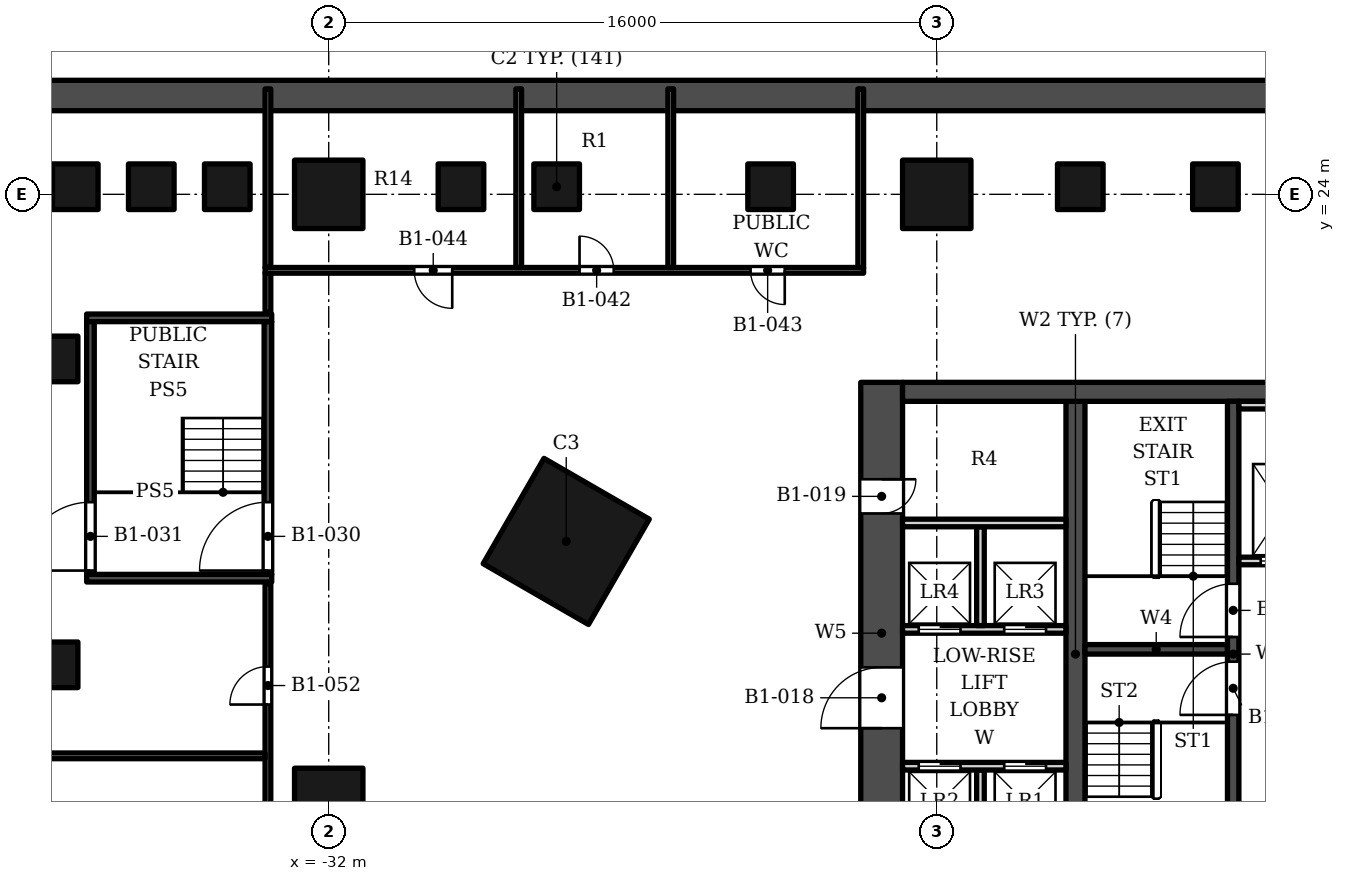
"""IFC4 building model, lengths in metres.
Left out: names, types, materials, properties, quantities, classifications, styles, units other than length and angle.
Written with IfcOpenShell. Run it as: python <this file> out.ifc"""

import sys

from ifc_helpers import new_model, si_unit, direction, frame, frame_2d, origin, origin_2d, place, context, subcontext, project, spatial, rectangle, extrude, element, fill, save


model = new_model("IFC4")
c1 = context("Model", 3, precision=1e-05, world=origin(), true_north=direction((0.0, 1.0)))
c2 = subcontext(c1, "Body", "Model", "MODEL_VIEW")
j1 = project(units=[si_unit("LENGTHUNIT", "METRE"), si_unit("PLANEANGLEUNIT", "RADIAN")], contexts=[c1])
p1 = place(None, origin())
s1 = spatial("IfcSite", under=j1, at=p1, CompositionType="ELEMENT")
p2 = place(p1, origin())
s2 = spatial("IfcBuilding", under=s1, at=p2, CompositionType="ELEMENT")
p3 = place(p2, frame((0.0, 0.0, -5.0)))
s3 = spatial("IfcBuildingStorey", under=s2, at=p3, CompositionType="ELEMENT", Elevation=-5.0)
p4 = place(p3, frame((46.0, 26.6, 0.0), z_axis=(0.0, 0.0, 1.0), x_axis=(-1.0, 0.0, 0.0)))
e1 = element("IfcWall", 1, at=p4, inside=s3, PredefinedType="SHEAR", context=c2, shape_type="SweptSolid", body=[
    extrude(rectangle(XDim=92.0, YDim=0.8, at=frame_2d((46.0, 0.0))), origin(), (0.0, 0.0, 1.0), 5.0),
])
for number, where, z_axis, x_axis in (
    (2, (-32.0, 8.0, 0.0), (0.0, 0.0, 1.0), (1.0, 0.0, 0.0)),
    (3, (-32.0, 24.0, 0.0), (0.0, 0.0, 1.0), (1.0, 0.0, 0.0)),
    (4, (-16.0, 24.0, 0.0), (0.0, 0.0, 1.0), (1.0, 0.0, 0.0)),
):
    element("IfcColumn", number, at=place(p3, frame(where, z_axis=z_axis, x_axis=x_axis)), inside=s3, PredefinedType="COLUMN", context=c2, shape_type="SweptSolid", body=[
        extrude(rectangle(XDim=1.8, YDim=1.8, at=origin_2d()), origin(), (0.0, 0.0, 1.0), 5.0),
    ])
for number, where, z_axis, x_axis in (
    (5, (-39.2, 19.669, 0.0), (0.0, 0.0, 1.0), (1.0, 0.0, 0.0)),
    (6, (-34.669, 24.2, 0.0), (0.0, 0.0, 1.0), (1.0, 0.0, 0.0)),
    (7, (-39.2, 11.62, 0.0), (0.0, 0.0, 1.0), (1.0, 0.0, 0.0)),
    (8, (-26.002, 24.2, 0.0), (0.0, 0.0, 1.0), (1.0, 0.0, 0.0)),
    (9, (-8.667, 24.2, 0.0), (0.0, 0.0, 1.0), (1.0, 0.0, 0.0)),
    (10, (-36.669, 24.2, 0.0), (0.0, 0.0, 1.0), (1.0, 0.0, 0.0)),
    (11, (-28.52, 24.2, 0.0), (0.0, 0.0, 1.0), (1.0, 0.0, 0.0)),
    (12, (-20.372, 24.2, 0.0), (0.0, 0.0, 1.0), (1.0, 0.0, 0.0)),
    (13, (-12.223, 24.2, 0.0), (0.0, 0.0, 1.0), (1.0, 0.0, 0.0)),
    (14, (-38.669, 24.2, 0.0), (0.0, 0.0, 1.0), (1.0, 0.0, 0.0)),
):
    element("IfcColumn", number, at=place(p3, frame(where, z_axis=z_axis, x_axis=x_axis)), inside=s3, PredefinedType="COLUMN", context=c2, shape_type="SweptSolid", body=[
        extrude(rectangle(XDim=1.2, YDim=1.2, at=origin_2d()), origin(), (0.0, 0.0, 1.0), 5.0),
    ])
p5 = place(p3, frame((-25.75, 14.867, 0.0), z_axis=(0.0, 0.0, 1.0), x_axis=(0.866025386331, -0.50000003023, 0.0)))
e15 = element("IfcColumn", 15, at=p5, inside=s3, PredefinedType="COLUMN", context=c2, shape_type="SweptSolid", body=[
    extrude(rectangle(XDim=3.2, YDim=3.2, at=origin_2d()), origin(), (0.0, 0.0, 1.0), 5.0),
])
p6 = place(p3, frame((-16.9, 18.802, 0.0), z_axis=(0.0, 0.0, 1.0), x_axis=(1.0, 0.0, 0.0)))
e16 = element("IfcWall", 16, at=p6, inside=s3, PredefinedType="SHEAR", context=c2, shape_type="SweptSolid", body=[
    extrude(rectangle(XDim=33.8, YDim=0.5, at=frame_2d((16.9, 0.0))), origin(), (0.0, 0.0, 1.0), 5.0),
])
p7 = place(p3, frame((-12.35, 5.253, 0.0), z_axis=(0.0, 0.0, 1.0), x_axis=(0.0, 1.0, 0.0)))
e17 = element("IfcWall", 17, at=p7, inside=s3, PredefinedType="SHEAR", context=c2, shape_type="SweptSolid", body=[
    extrude(rectangle(XDim=13.3, YDim=0.5, at=frame_2d((6.65, 0.0))), origin(), (0.0, 0.0, 1.0), 5.0),
])
p8 = place(p3, frame((-8.2, 5.253, 0.0), z_axis=(0.0, 0.0, 1.0), x_axis=(0.0, 1.0, 0.0)))
e18 = element("IfcWall", 18, at=p8, inside=s3, PredefinedType="SHEAR", context=c2, shape_type="SweptSolid", body=[
    extrude(rectangle(XDim=13.3, YDim=0.3, at=frame_2d((6.65, 0.0))), origin(), (0.0, 0.0, 1.0), 5.0),
])
p9 = place(p8, frame((7.1, 0.0, 0.0)))
e19 = element("IfcOpeningElement", 19, at=p9, cuts=e18, PredefinedType="OPENING", context=c2, shape_type="SweptSolid", body=[
    extrude(rectangle(XDim=1.4, YDim=2.1, at=frame_2d((0.7, 1.05))), frame((0.0, 0.16, 0.0), z_axis=(0.0, -1.0, 0.0), x_axis=(1.0, 0.0, 0.0)), (0.0, 0.0, 1.0), 0.32),
])
p10 = place(p8, frame((5.05, 0.0, 0.0)))
e20 = element("IfcOpeningElement", 20, at=p10, cuts=e18, PredefinedType="OPENING", context=c2, shape_type="SweptSolid", body=[
    extrude(rectangle(XDim=1.4, YDim=2.1, at=frame_2d((0.7, 1.05))), frame((0.0, 0.16, 0.0), z_axis=(0.0, -1.0, 0.0), x_axis=(1.0, 0.0, 0.0)), (0.0, 0.0, 1.0), 0.32),
])
p11 = place(p3, frame((-12.1, 12.028, 0.0), z_axis=(0.0, 0.0, 1.0), x_axis=(1.0, 0.0, 0.0)))
e21 = element("IfcWall", 21, at=p11, inside=s3, PredefinedType="SHEAR", context=c2, shape_type="SweptSolid", body=[
    extrude(rectangle(XDim=3.75, YDim=0.25, at=frame_2d((1.875, 0.0))), origin(), (0.0, 0.0, 1.0), 5.0),
])
p12 = place(p3, frame((-17.45, 5.853, 0.0), z_axis=(0.0, 0.0, 1.0), x_axis=(0.0, 1.0, 0.0)))
e22 = element("IfcWall", 22, at=p12, inside=s3, PredefinedType="SHEAR", context=c2, shape_type="SweptSolid", body=[
    extrude(rectangle(XDim=13.2, YDim=1.1, at=frame_2d((6.6, 0.0))), origin(), (0.0, 0.0, 1.0), 5.0),
])
p13 = place(p12, frame((4.1, 0.0, 0.0)))
e23 = element("IfcOpeningElement", 23, at=p13, cuts=e22, PredefinedType="OPENING", context=c2, shape_type="SweptSolid", body=[
    extrude(rectangle(XDim=1.6, YDim=2.1, at=frame_2d((0.8, 1.05))), frame((0.0, 0.56, 0.0), z_axis=(0.0, -1.0, 0.0), x_axis=(1.0, 0.0, 0.0)), (0.0, 0.0, 1.0), 1.12),
])
p14 = place(p12, frame((9.75, 0.0, 0.0)))
e24 = element("IfcOpeningElement", 24, at=p14, cuts=e22, PredefinedType="OPENING", context=c2, shape_type="SweptSolid", body=[
    extrude(rectangle(XDim=0.9, YDim=2.1, at=frame_2d((0.45, 1.05))), frame((0.0, 0.56, 0.0), z_axis=(0.0, -1.0, 0.0), x_axis=(1.0, 0.0, 0.0)), (0.0, 0.0, 1.0), 1.12),
])
p15 = place(p3, frame((-14.85, 6.353, 0.0), z_axis=(0.0, 0.0, 1.0), x_axis=(0.0, 1.0, 0.0)))
e25 = element("IfcWall", 25, at=p15, inside=s3, PredefinedType="SOLIDWALL", context=c2, shape_type="SweptSolid", body=[
    extrude(rectangle(XDim=2.5, YDim=0.2, at=frame_2d((1.25, 0.0))), origin(), (0.0, 0.0, 1.0), 4.45),
])
p16 = place(p3, frame((-16.9, 8.953, 0.0), z_axis=(0.0, 0.0, 1.0), x_axis=(1.0, 0.0, 0.0)))
e26 = element("IfcWall", 26, at=p16, inside=s3, PredefinedType="SOLIDWALL", context=c2, shape_type="SweptSolid", body=[
    extrude(rectangle(XDim=4.3, YDim=0.2, at=frame_2d((2.15, 0.0))), origin(), (0.0, 0.0, 1.0), 4.45),
])
p17 = place(p16, frame((2.675, 0.0, 0.0)))
e27 = element("IfcOpeningElement", 27, at=p17, cuts=e26, PredefinedType="OPENING", context=c2, shape_type="SweptSolid", body=[
    extrude(rectangle(XDim=1.1, YDim=2.1, at=frame_2d((0.55, 1.05))), frame((0.0, 0.11, 0.0), z_axis=(0.0, -1.0, 0.0), x_axis=(1.0, 0.0, 0.0)), (0.0, 0.0, 1.0), 0.22),
])
p18 = place(p16, frame((0.425, 0.0, 0.0)))
e28 = element("IfcOpeningElement", 28, at=p18, cuts=e26, PredefinedType="OPENING", context=c2, shape_type="SweptSolid", body=[
    extrude(rectangle(XDim=1.1, YDim=2.1, at=frame_2d((0.55, 1.05))), frame((0.0, 0.11, 0.0), z_axis=(0.0, -1.0, 0.0), x_axis=(1.0, 0.0, 0.0)), (0.0, 0.0, 1.0), 0.22),
])
p19 = place(p3, frame((-16.9, 12.552, 0.0), z_axis=(0.0, 0.0, 1.0), x_axis=(1.0, 0.0, 0.0)))
e29 = element("IfcWall", 29, at=p19, inside=s3, PredefinedType="SOLIDWALL", context=c2, shape_type="SweptSolid", body=[
    extrude(rectangle(XDim=4.3, YDim=0.2, at=frame_2d((2.15, 0.0))), origin(), (0.0, 0.0, 1.0), 4.45),
])
p20 = place(p19, frame((2.675, 0.0, 0.0)))
e30 = element("IfcOpeningElement", 30, at=p20, cuts=e29, PredefinedType="OPENING", context=c2, shape_type="SweptSolid", body=[
    extrude(rectangle(XDim=1.1, YDim=2.1, at=frame_2d((0.55, 1.05))), frame((0.0, 0.11, 0.0), z_axis=(0.0, -1.0, 0.0), x_axis=(1.0, 0.0, 0.0)), (0.0, 0.0, 1.0), 0.22),
])
p21 = place(p19, frame((0.425, 0.0, 0.0)))
e31 = element("IfcOpeningElement", 31, at=p21, cuts=e29, PredefinedType="OPENING", context=c2, shape_type="SweptSolid", body=[
    extrude(rectangle(XDim=1.1, YDim=2.1, at=frame_2d((0.55, 1.05))), frame((0.0, 0.11, 0.0), z_axis=(0.0, -1.0, 0.0), x_axis=(1.0, 0.0, 0.0)), (0.0, 0.0, 1.0), 0.22),
])
p22 = place(p3, frame((-14.85, 12.653, 0.0), z_axis=(0.0, 0.0, 1.0), x_axis=(0.0, 1.0, 0.0)))
e32 = element("IfcWall", 32, at=p22, inside=s3, PredefinedType="SOLIDWALL", context=c2, shape_type="SweptSolid", body=[
    extrude(rectangle(XDim=2.6, YDim=0.2, at=frame_2d((1.3, 0.0))), origin(), (0.0, 0.0, 1.0), 4.45),
])
p23 = place(p3, frame((-8.05, 14.353, 0.0), z_axis=(0.0, 0.0, 1.0), x_axis=(1.0, 0.0, 0.0)))
e33 = element("IfcWall", 33, at=p23, inside=s3, PredefinedType="SOLIDWALL", context=c2, shape_type="SweptSolid", body=[
    extrude(rectangle(XDim=2.35, YDim=0.2, at=frame_2d((1.175, 0.0))), origin(), (0.0, 0.0, 1.0), 4.45),
])
p24 = place(p23, frame((0.575, 0.0, 0.0)))
e34 = element("IfcOpeningElement", 34, at=p24, cuts=e33, PredefinedType="OPENING", context=c2, shape_type="SweptSolid", body=[
    extrude(rectangle(XDim=1.2, YDim=2.1, at=frame_2d((0.6, 1.05))), frame((0.0, 0.11, 0.0), z_axis=(0.0, -1.0, 0.0), x_axis=(1.0, 0.0, 0.0)), (0.0, 0.0, 1.0), 0.22),
])
p25 = place(p3, frame((-16.9, 15.353, 0.0), z_axis=(0.0, 0.0, 1.0), x_axis=(1.0, 0.0, 0.0)))
e35 = element("IfcWall", 35, at=p25, inside=s3, PredefinedType="SOLIDWALL", context=c2, shape_type="SweptSolid", body=[
    extrude(rectangle(XDim=4.3, YDim=0.2, at=frame_2d((2.15, 0.0))), origin(), (0.0, 0.0, 1.0), 4.45),
])
p26 = place(p3, frame((-8.05, 18.453, 0.0), z_axis=(0.0, 0.0, 1.0), x_axis=(1.0, 0.0, 0.0)))
e36 = element("IfcWall", 36, at=p26, inside=s3, PredefinedType="SOLIDWALL", context=c2, shape_type="SweptSolid", body=[
    extrude(rectangle(XDim=2.35, YDim=0.2, at=frame_2d((1.175, 0.0))), origin(), (0.0, 0.0, 1.0), 4.45),
])
for number, where, z_axis, x_axis in (
    (37, (-38.37, 13.9, 0.0), (0.0, 0.0, 1.0), (1.0, 0.0, 0.0)),
    (38, (-38.37, 20.75, 0.0), (0.0, 0.0, 1.0), (1.0, 0.0, 0.0)),
):
    element("IfcWall", number, at=place(p3, frame(where, z_axis=z_axis, x_axis=x_axis)), inside=s3, PredefinedType="SOLIDWALL", context=c2, shape_type="SweptSolid", body=[
        extrude(rectangle(XDim=4.87, YDim=0.2, at=frame_2d((2.435, 0.0))), origin(), (0.0, 0.0, 1.0), 4.45),
    ])
p27 = place(p3, frame((-38.27, 14.0, 0.0), z_axis=(0.0, 0.0, 1.0), x_axis=(0.0, 1.0, 0.0)))
e39 = element("IfcWall", 39, at=p27, inside=s3, PredefinedType="SOLIDWALL", context=c2, shape_type="SweptSolid", body=[
    extrude(rectangle(XDim=6.65, YDim=0.2, at=frame_2d((3.325, 0.0))), origin(), (0.0, 0.0, 1.0), 4.45),
])
p28 = place(p27, frame((0.1, 0.0, 0.0)))
e40 = element("IfcOpeningElement", 40, at=p28, cuts=e39, PredefinedType="OPENING", context=c2, shape_type="SweptSolid", body=[
    extrude(rectangle(XDim=1.8, YDim=2.4, at=frame_2d((0.9, 1.2))), frame((0.0, 0.11, 0.0), z_axis=(0.0, -1.0, 0.0), x_axis=(1.0, 0.0, 0.0)), (0.0, 0.0, 1.0), 0.22),
])
p29 = place(p3, frame((-33.6, 14.0, 0.0), z_axis=(0.0, 0.0, 1.0), x_axis=(0.0, 1.0, 0.0)))
e41 = element("IfcWall", 41, at=p29, inside=s3, PredefinedType="SOLIDWALL", context=c2, shape_type="SweptSolid", body=[
    extrude(rectangle(XDim=6.65, YDim=0.2, at=frame_2d((3.325, 0.0))), origin(), (0.0, 0.0, 1.0), 4.45),
])
p30 = place(p29, frame((0.1, 0.0, 0.0)))
e42 = element("IfcOpeningElement", 42, at=p30, cuts=e41, PredefinedType="OPENING", context=c2, shape_type="SweptSolid", body=[
    extrude(rectangle(XDim=1.8, YDim=2.4, at=frame_2d((0.9, 1.2))), frame((0.0, 0.11, 0.0), z_axis=(0.0, -1.0, 0.0), x_axis=(1.0, 0.0, 0.0)), (0.0, 0.0, 1.0), 0.22),
])
p31 = place(p3, frame((-33.6, 4.69, 0.0), z_axis=(0.0, 0.0, 1.0), x_axis=(0.0, 1.0, 0.0)))
e43 = element("IfcWall", 43, at=p31, inside=s3, PredefinedType="PARTITIONING", context=c2, shape_type="SweptSolid", body=[
    extrude(rectangle(XDim=9.07, YDim=0.15, at=frame_2d((4.535, 0.0))), origin(), (0.0, 0.0, 1.0), 3.25),
])
p32 = place(p31, frame((5.885, 0.0, 0.0)))
e44 = element("IfcOpeningElement", 44, at=p32, cuts=e43, PredefinedType="OPENING", context=c2, shape_type="SweptSolid", body=[
    extrude(rectangle(XDim=1.0, YDim=2.1, at=frame_2d((0.5, 1.05))), frame((0.0, 0.085, 0.0), z_axis=(0.0, -1.0, 0.0), x_axis=(1.0, 0.0, 0.0)), (0.0, 0.0, 1.0), 0.17),
])
p33 = place(p3, frame((-51.775, 9.225, 0.0), z_axis=(0.0, 0.0, 1.0), x_axis=(1.0, 0.0, 0.0)))
e45 = element("IfcWall", 45, at=p33, inside=s3, PredefinedType="PARTITIONING", context=c2, shape_type="SweptSolid", body=[
    extrude(rectangle(XDim=18.1, YDim=0.15, at=frame_2d((9.05, 0.0))), origin(), (0.0, 0.0, 1.0), 3.55),
])
p34 = place(p3, frame((-33.6, 20.89, 0.0), z_axis=(0.0, 0.0, 1.0), x_axis=(0.0, 1.0, 0.0)))
e46 = element("IfcWall", 46, at=p34, inside=s3, PredefinedType="PARTITIONING", context=c2, shape_type="SweptSolid", body=[
    extrude(rectangle(XDim=1.035, YDim=0.15, at=frame_2d((0.518, 0.0))), origin(), (0.0, 0.0, 1.0), 4.45),
])
p35 = place(p3, frame((-33.675, 22.0, 0.0), z_axis=(0.0, 0.0, 1.0), x_axis=(1.0, 0.0, 0.0)))
e47 = element("IfcWall", 47, at=p35, inside=s3, PredefinedType="PARTITIONING", context=c2, shape_type="SweptSolid", body=[
    extrude(rectangle(XDim=15.75, YDim=0.15, at=frame_2d((7.875, 0.0))), origin(), (0.0, 0.0, 1.0), 3.25),
])
p36 = place(p35, frame((8.275, 0.0, 0.0)))
e48 = element("IfcOpeningElement", 48, at=p36, cuts=e47, PredefinedType="OPENING", context=c2, shape_type="SweptSolid", body=[
    extrude(rectangle(XDim=0.9, YDim=2.1, at=frame_2d((0.45, 1.05))), frame((0.0, 0.085, 0.0), z_axis=(0.0, -1.0, 0.0), x_axis=(1.0, 0.0, 0.0)), (0.0, 0.0, 1.0), 0.17),
])
p37 = place(p35, frame((12.775, 0.0, 0.0)))
e49 = element("IfcOpeningElement", 49, at=p37, cuts=e47, PredefinedType="OPENING", context=c2, shape_type="SweptSolid", body=[
    extrude(rectangle(XDim=0.9, YDim=2.1, at=frame_2d((0.45, 1.05))), frame((0.0, 0.085, 0.0), z_axis=(0.0, -1.0, 0.0), x_axis=(1.0, 0.0, 0.0)), (0.0, 0.0, 1.0), 0.17),
])
p38 = place(p35, frame((3.925, 0.0, 0.0)))
e50 = element("IfcOpeningElement", 50, at=p38, cuts=e47, PredefinedType="OPENING", context=c2, shape_type="SweptSolid", body=[
    extrude(rectangle(XDim=1.0, YDim=2.1, at=frame_2d((0.5, 1.05))), frame((0.0, 0.085, 0.0), z_axis=(0.0, -1.0, 0.0), x_axis=(1.0, 0.0, 0.0)), (0.0, 0.0, 1.0), 0.17),
])
for number, where, z_axis, x_axis in (
    (51, (-33.6, 22.075, 0.0), (0.0, 0.0, 1.0), (0.0, 1.0, 0.0)),
    (52, (-27.0, 22.075, 0.0), (0.0, 0.0, 1.0), (0.0, 1.0, 0.0)),
):
    element("IfcWall", number, at=place(p3, frame(where, z_axis=z_axis, x_axis=x_axis)), inside=s3, PredefinedType="PARTITIONING", context=c2, shape_type="SweptSolid", body=[
        extrude(rectangle(XDim=4.7, YDim=0.15, at=frame_2d((2.35, 0.0))), origin(), (0.0, 0.0, 1.0), 3.55),
    ])
for number, where, z_axis, x_axis in (
    (53, (-23.0, 22.075, 0.0), (0.0, 0.0, 1.0), (0.0, 1.0, 0.0)),
    (54, (-18.0, 22.075, 0.0), (0.0, 0.0, 1.0), (0.0, 1.0, 0.0)),
):
    element("IfcWall", number, at=place(p3, frame(where, z_axis=z_axis, x_axis=x_axis)), inside=s3, PredefinedType="PARTITIONING", context=c2, shape_type="SweptSolid", body=[
        extrude(rectangle(XDim=4.7, YDim=0.15, at=frame_2d((2.35, 0.0))), origin(), (0.0, 0.0, 1.0), 3.25),
    ])
p39 = place(p24, origin())
e55 = element("IfcDoor", 55, at=p39, inside=s3, OperationType="DOUBLE_DOOR_SLIDING", PredefinedType="DOOR", context=c2, shape_type="SweptSolid", body=[
    extrude(rectangle(XDim=1.2, YDim=2.1, at=frame_2d((0.6, 1.05))), frame((0.0, 0.025, 0.0), z_axis=(0.0, -1.0, 0.0), x_axis=(1.0, 0.0, 0.0)), (0.0, 0.0, 1.0), 0.05),
])
fill(e34, e55)
p40 = place(p17, origin())
e56 = element("IfcDoor", 56, at=p40, inside=s3, OperationType="DOUBLE_DOOR_SLIDING", PredefinedType="DOOR", context=c2, shape_type="SweptSolid", body=[
    extrude(rectangle(XDim=1.1, YDim=2.1, at=frame_2d((0.55, 1.05))), frame((0.0, 0.025, 0.0), z_axis=(0.0, -1.0, 0.0), x_axis=(1.0, 0.0, 0.0)), (0.0, 0.0, 1.0), 0.05),
])
fill(e27, e56)
p41 = place(p20, origin())
e57 = element("IfcDoor", 57, at=p41, inside=s3, OperationType="DOUBLE_DOOR_SLIDING", PredefinedType="DOOR", context=c2, shape_type="SweptSolid", body=[
    extrude(rectangle(XDim=1.1, YDim=2.1, at=frame_2d((0.55, 1.05))), frame((0.0, 0.025, 0.0), z_axis=(0.0, -1.0, 0.0), x_axis=(1.0, 0.0, 0.0)), (0.0, 0.0, 1.0), 0.05),
])
fill(e30, e57)
p42 = place(p18, origin())
e58 = element("IfcDoor", 58, at=p42, inside=s3, OperationType="DOUBLE_DOOR_SLIDING", PredefinedType="DOOR", context=c2, shape_type="SweptSolid", body=[
    extrude(rectangle(XDim=1.1, YDim=2.1, at=frame_2d((0.55, 1.05))), frame((0.0, 0.025, 0.0), z_axis=(0.0, -1.0, 0.0), x_axis=(1.0, 0.0, 0.0)), (0.0, 0.0, 1.0), 0.05),
])
fill(e28, e58)
p43 = place(p21, origin())
e59 = element("IfcDoor", 59, at=p43, inside=s3, OperationType="DOUBLE_DOOR_SLIDING", PredefinedType="DOOR", context=c2, shape_type="SweptSolid", body=[
    extrude(rectangle(XDim=1.1, YDim=2.1, at=frame_2d((0.55, 1.05))), frame((0.0, 0.025, 0.0), z_axis=(0.0, -1.0, 0.0), x_axis=(1.0, 0.0, 0.0)), (0.0, 0.0, 1.0), 0.05),
])
fill(e31, e59)
p44 = place(p9, origin())
e60 = element("IfcDoor", 60, at=p44, inside=s3, OperationType="SINGLE_SWING_LEFT", PredefinedType="DOOR", context=c2, shape_type="SweptSolid", body=[
    extrude(rectangle(XDim=1.4, YDim=2.1, at=frame_2d((0.7, 1.05))), frame((0.0, 0.025, 0.0), z_axis=(0.0, -1.0, 0.0), x_axis=(1.0, 0.0, 0.0)), (0.0, 0.0, 1.0), 0.05),
])
fill(e19, e60)
p45 = place(p10, origin())
e61 = element("IfcDoor", 61, at=p45, inside=s3, OperationType="SINGLE_SWING_LEFT", PredefinedType="DOOR", context=c2, shape_type="SweptSolid", body=[
    extrude(rectangle(XDim=1.4, YDim=2.1, at=frame_2d((0.7, 1.05))), frame((0.0, 0.025, 0.0), z_axis=(0.0, -1.0, 0.0), x_axis=(1.0, 0.0, 0.0)), (0.0, 0.0, 1.0), 0.05),
])
fill(e20, e61)
p46 = place(p13, origin())
e62 = element("IfcDoor", 62, at=p46, inside=s3, OperationType="DOUBLE_DOOR_SINGLE_SWING", PredefinedType="DOOR", context=c2, shape_type="SweptSolid", body=[
    extrude(rectangle(XDim=1.6, YDim=2.1, at=frame_2d((0.8, 1.05))), frame((0.0, -0.225, 0.0), z_axis=(0.0, -1.0, 0.0), x_axis=(1.0, 0.0, 0.0)), (0.0, 0.0, 1.0), 0.05),
])
fill(e23, e62)
p47 = place(p14, origin())
e63 = element("IfcDoor", 63, at=p47, inside=s3, OperationType="SINGLE_SWING_RIGHT", PredefinedType="DOOR", context=c2, shape_type="SweptSolid", body=[
    extrude(rectangle(XDim=0.9, YDim=2.1, at=frame_2d((0.45, 1.05))), frame((0.0, -0.225, 0.0), z_axis=(0.0, -1.0, 0.0), x_axis=(1.0, 0.0, 0.0)), (0.0, 0.0, 1.0), 0.05),
])
fill(e24, e63)
p48 = place(p30, origin())
e64 = element("IfcDoor", 64, at=p48, inside=s3, OperationType="DOUBLE_DOOR_SINGLE_SWING", PredefinedType="DOOR", context=c2, shape_type="SweptSolid", body=[
    extrude(rectangle(XDim=1.8, YDim=2.4, at=frame_2d((0.9, 1.2))), frame((0.0, 0.025, 0.0), z_axis=(0.0, -1.0, 0.0), x_axis=(1.0, 0.0, 0.0)), (0.0, 0.0, 1.0), 0.05),
])
fill(e42, e64)
p49 = place(p28, origin())
e65 = element("IfcDoor", 65, at=p49, inside=s3, OperationType="DOUBLE_DOOR_SINGLE_SWING", PredefinedType="DOOR", context=c2, shape_type="SweptSolid", body=[
    extrude(rectangle(XDim=1.8, YDim=2.4, at=frame_2d((0.9, 1.2))), frame((0.0, 0.025, 0.0), z_axis=(0.0, -1.0, 0.0), x_axis=(1.0, 0.0, 0.0)), (0.0, 0.0, 1.0), 0.05),
])
fill(e40, e65)
p50 = place(p36, origin())
e66 = element("IfcDoor", 66, at=p50, inside=s3, OperationType="SINGLE_SWING_LEFT", PredefinedType="DOOR", context=c2, shape_type="SweptSolid", body=[
    extrude(rectangle(XDim=0.9, YDim=2.1, at=frame_2d((0.45, 1.05))), frame((0.0, 0.025, 0.0), z_axis=(0.0, -1.0, 0.0), x_axis=(1.0, 0.0, 0.0)), (0.0, 0.0, 1.0), 0.05),
])
fill(e48, e66)
p51 = place(p37, origin())
e67 = element("IfcDoor", 67, at=p51, inside=s3, OperationType="SINGLE_SWING_RIGHT", PredefinedType="DOOR", context=c2, shape_type="SweptSolid", body=[
    extrude(rectangle(XDim=0.9, YDim=2.1, at=frame_2d((0.45, 1.05))), frame((0.0, 0.025, 0.0), z_axis=(0.0, -1.0, 0.0), x_axis=(1.0, 0.0, 0.0)), (0.0, 0.0, 1.0), 0.05),
])
fill(e49, e67)
p52 = place(p38, origin())
e68 = element("IfcDoor", 68, at=p52, inside=s3, OperationType="SINGLE_SWING_RIGHT", PredefinedType="DOOR", context=c2, shape_type="SweptSolid", body=[
    extrude(rectangle(XDim=1.0, YDim=2.1, at=frame_2d((0.5, 1.05))), frame((0.0, 0.025, 0.0), z_axis=(0.0, -1.0, 0.0), x_axis=(1.0, 0.0, 0.0)), (0.0, 0.0, 1.0), 0.05),
])
fill(e50, e68)
p53 = place(p32, origin())
e69 = element("IfcDoor", 69, at=p53, inside=s3, OperationType="SINGLE_SWING_LEFT", PredefinedType="DOOR", context=c2, shape_type="SweptSolid", body=[
    extrude(rectangle(XDim=1.0, YDim=2.1, at=frame_2d((0.5, 1.05))), frame((0.0, 0.025, 0.0), z_axis=(0.0, -1.0, 0.0), x_axis=(1.0, 0.0, 0.0)), (0.0, 0.0, 1.0), 0.05),
])
fill(e44, e69)
save(model, sys.argv[1])
